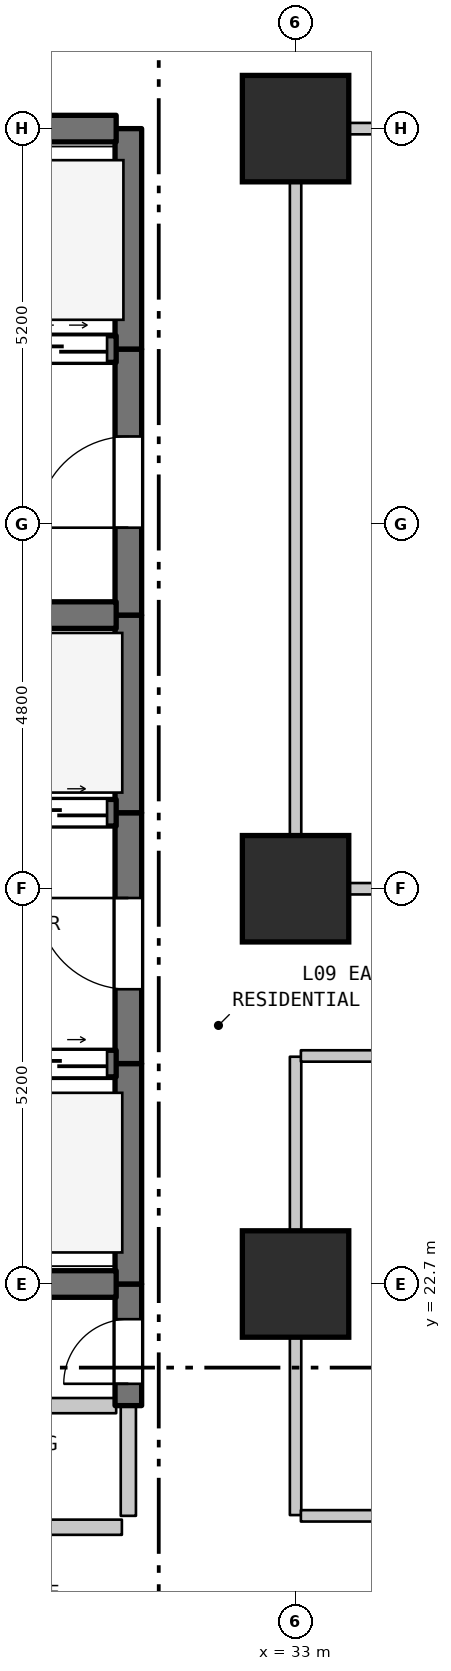
"""IFC4 building model, lengths in metres.
Left out: names, types, materials, properties, quantities, classifications, styles, units other than length and angle.
Written with IfcOpenShell. Run it as: python <this file> out.ifc"""

import sys

from ifc_helpers import new_model, si_unit, direction, frame, frame_2d, origin, origin_2d, place, context, subcontext, project, spatial, rectangle, extrude, element, fill, save


model = new_model("IFC4")
c1 = context("Model", 3, precision=1e-05, world=origin(), true_north=direction((0.0, 1.0)))
c2 = subcontext(c1, "Body", "Model", "MODEL_VIEW")
j1 = project(units=[si_unit("LENGTHUNIT", "METRE"), si_unit("PLANEANGLEUNIT", "RADIAN")], contexts=[c1])
p1 = place(None, origin())
s1 = spatial("IfcSite", under=j1, at=p1, CompositionType="ELEMENT")
p2 = place(p1, origin())
s2 = spatial("IfcBuilding", under=s1, at=p2, CompositionType="ELEMENT")
p3 = place(p2, frame((0.0, 0.0, 42.5)))
s3 = spatial("IfcBuildingStorey", under=s2, at=p3, CompositionType="ELEMENT", Elevation=42.5)
for number, where, z_axis, x_axis in (
    (1, (33.0, 22.7, 0.0), (0.0, 0.0, 1.0), (1.0, 0.0, 0.0)),
    (2, (33.0, 27.9, 0.0), (0.0, 0.0, 1.0), (1.0, 0.0, 0.0)),
    (3, (33.0, 37.9, 0.0), (0.0, 0.0, 1.0), (1.0, 0.0, 0.0)),
):
    element("IfcColumn", number, at=place(p3, frame(where, z_axis=z_axis, x_axis=x_axis)), inside=s3, PredefinedType="COLUMN", context=c2, shape_type="SweptSolid", body=[
        extrude(rectangle(XDim=1.4, YDim=1.4, at=origin_2d()), origin(), (0.0, 0.0, 1.0), 3.7),
    ])
p4 = place(p3, frame((30.8, 19.65, 0.0), z_axis=(0.0, 0.0, 1.0), x_axis=(0.0, 1.0, 0.0)))
e4 = element("IfcWall", 4, at=p4, inside=s3, PredefinedType="STANDARD", context=c2, shape_type="SweptSolid", body=[
    extrude(rectangle(XDim=1.45, YDim=0.2, at=frame_2d((0.725, 0.0))), origin(), (0.0, 0.0, 1.0), 3.385),
])
p5 = place(p3, frame((30.8, 21.1, 0.0), z_axis=(0.0, 0.0, 1.0), x_axis=(0.0, 1.0, 0.0)))
e5 = element("IfcWall", 5, at=p5, inside=s3, PredefinedType="SHEAR", context=c2, shape_type="SweptSolid", body=[
    extrude(rectangle(XDim=1.6, YDim=0.35, at=frame_2d((0.8, 0.0))), origin(), (0.0, 0.0, 1.0), 3.385),
])
p6 = place(p5, frame((0.287, 0.0, 0.0)))
e6 = element("IfcOpeningElement", 6, at=p6, cuts=e5, PredefinedType="OPENING", context=c2, shape_type="SweptSolid", body=[
    extrude(rectangle(XDim=0.85, YDim=2.1, at=frame_2d((0.425, 1.05))), frame((0.0, 0.185, 0.0), z_axis=(0.0, -1.0, 0.0), x_axis=(1.0, 0.0, 0.0)), (0.0, 0.0, 1.0), 0.37),
])
p7 = place(p3, frame((30.8, 22.7, 0.0), z_axis=(0.0, 0.0, 1.0), x_axis=(0.0, 1.0, 0.0)))
e7 = element("IfcWall", 7, at=p7, inside=s3, PredefinedType="SHEAR", context=c2, shape_type="SweptSolid", body=[
    extrude(rectangle(XDim=2.9, YDim=0.35, at=frame_2d((1.45, 0.0))), origin(), (0.0, 0.0, 1.0), 3.385),
])
p8 = place(p3, frame((30.8, 25.6, 0.0), z_axis=(0.0, 0.0, 1.0), x_axis=(0.0, 1.0, 0.0)))
e8 = element("IfcWall", 8, at=p8, inside=s3, PredefinedType="SHEAR", context=c2, shape_type="SweptSolid", body=[
    extrude(rectangle(XDim=3.3, YDim=0.35, at=frame_2d((1.65, 0.0))), origin(), (0.0, 0.0, 1.0), 3.385),
])
p9 = place(p8, frame((0.978, 0.0, 0.0)))
e9 = element("IfcOpeningElement", 9, at=p9, cuts=e8, PredefinedType="OPENING", context=c2, shape_type="SweptSolid", body=[
    extrude(rectangle(XDim=1.2, YDim=2.2, at=frame_2d((0.6, 1.1))), frame((0.0, 0.185, 0.0), z_axis=(0.0, -1.0, 0.0), x_axis=(1.0, 0.0, 0.0)), (0.0, 0.0, 1.0), 0.37),
])
p10 = place(p3, frame((30.8, 28.9, 0.0), z_axis=(0.0, 0.0, 1.0), x_axis=(0.0, 1.0, 0.0)))
e10 = element("IfcWall", 10, at=p10, inside=s3, PredefinedType="SHEAR", context=c2, shape_type="SweptSolid", body=[
    extrude(rectangle(XDim=2.6, YDim=0.35, at=frame_2d((1.3, 0.0))), origin(), (0.0, 0.0, 1.0), 3.385),
])
p11 = place(p3, frame((30.8, 31.5, 0.0), z_axis=(0.0, 0.0, 1.0), x_axis=(0.0, 1.0, 0.0)))
e11 = element("IfcWall", 11, at=p11, inside=s3, PredefinedType="SHEAR", context=c2, shape_type="SweptSolid", body=[
    extrude(rectangle(XDim=3.5, YDim=0.35, at=frame_2d((1.75, 0.0))), origin(), (0.0, 0.0, 1.0), 3.385),
])
p12 = place(p11, frame((1.15, 0.0, 0.0)))
e12 = element("IfcOpeningElement", 12, at=p12, cuts=e11, PredefinedType="OPENING", context=c2, shape_type="SweptSolid", body=[
    extrude(rectangle(XDim=1.2, YDim=2.2, at=frame_2d((0.6, 1.1))), frame((0.0, 0.185, 0.0), z_axis=(0.0, -1.0, 0.0), x_axis=(1.0, 0.0, 0.0)), (0.0, 0.0, 1.0), 0.37),
])
p13 = place(p3, frame((30.8, 35.0, 0.0), z_axis=(0.0, 0.0, 1.0), x_axis=(0.0, 1.0, 0.0)))
e13 = element("IfcWall", 13, at=p13, inside=s3, PredefinedType="SHEAR", context=c2, shape_type="SweptSolid", body=[
    extrude(rectangle(XDim=2.9, YDim=0.35, at=frame_2d((1.45, 0.0))), origin(), (0.0, 0.0, 1.0), 3.385),
])
p14 = place(p3, frame((33.0, 19.66, 0.0), z_axis=(0.0, 0.0, 1.0), x_axis=(0.0, 1.0, 0.0)))
e14 = element("IfcWall", 14, at=p14, inside=s3, PredefinedType="STANDARD", context=c2, shape_type="SweptSolid", body=[
    extrude(rectangle(XDim=6.03, YDim=0.15, at=frame_2d((3.015, 0.0))), origin(), (0.0, 0.0, 1.0), 2.885),
])
p15 = place(p3, frame((33.0, 27.91, 0.0), z_axis=(0.0, 0.0, 1.0), x_axis=(0.0, 1.0, 0.0)))
e15 = element("IfcWall", 15, at=p15, inside=s3, PredefinedType="STANDARD", context=c2, shape_type="SweptSolid", body=[
    extrude(rectangle(XDim=9.98, YDim=0.15, at=frame_2d((4.99, 0.0))), origin(), (0.0, 0.0, 1.0), 2.885),
])
p16 = place(p3, frame((27.285, 19.5, 0.0), z_axis=(0.0, 0.0, 1.0), x_axis=(1.0, 0.0, 0.0)))
e16 = element("IfcWall", 16, at=p16, inside=s3, PredefinedType="STANDARD", context=c2, shape_type="SweptSolid", body=[
    extrude(rectangle(XDim=3.43, YDim=0.2, at=frame_2d((1.715, 0.0))), origin(), (0.0, 0.0, 1.0), 3.385),
])
p17 = place(p16, frame((1.192, 0.0, 0.0)))
e17 = element("IfcOpeningElement", 17, at=p17, cuts=e16, PredefinedType="OPENING", context=c2, shape_type="SweptSolid", body=[
    extrude(rectangle(XDim=0.9, YDim=2.15, at=frame_2d((0.45, 1.075))), frame((0.0, 0.11, 0.0), z_axis=(0.0, -1.0, 0.0), x_axis=(1.0, 0.0, 0.0)), (0.0, 0.0, 1.0), 0.22),
])
p18 = place(p3, frame((33.07, 19.65, 0.0), z_axis=(0.0, 0.0, 1.0), x_axis=(1.0, 0.0, 0.0)))
e18 = element("IfcWall", 18, at=p18, inside=s3, PredefinedType="STANDARD", context=c2, shape_type="SweptSolid", body=[
    extrude(rectangle(XDim=33.27, YDim=0.15, at=frame_2d((16.635, 0.0))), origin(), (0.0, 0.0, 1.0), 3.385),
])
p19 = place(p18, frame((16.065, 0.0, 0.0)))
e19 = element("IfcOpeningElement", 19, at=p19, cuts=e18, PredefinedType="OPENING", context=c2, shape_type="SweptSolid", body=[
    extrude(rectangle(XDim=1.0, YDim=2.15, at=frame_2d((0.5, 1.075))), frame((0.0, 0.085, 0.0), z_axis=(0.0, -1.0, 0.0), x_axis=(1.0, 0.0, 0.0)), (0.0, 0.0, 1.0), 0.17),
])
p20 = place(p3, frame((27.285, 21.1, 0.0), z_axis=(0.0, 0.0, 1.0), x_axis=(1.0, 0.0, 0.0)))
e20 = element("IfcWall", 20, at=p20, inside=s3, PredefinedType="STANDARD", context=c2, shape_type="SweptSolid", body=[
    extrude(rectangle(XDim=3.355, YDim=0.2, at=frame_2d((1.677, 0.0))), origin(), (0.0, 0.0, 1.0), 3.385),
])
p21 = place(p3, frame((27.46, 22.7, 0.0), z_axis=(0.0, 0.0, 1.0), x_axis=(1.0, 0.0, 0.0)))
e21 = element("IfcWall", 21, at=p21, inside=s3, PredefinedType="SHEAR", context=c2, shape_type="SweptSolid", body=[
    extrude(rectangle(XDim=3.18, YDim=0.35, at=frame_2d((1.59, 0.0))), origin(), (0.0, 0.0, 1.0), 3.385),
])
p22 = place(p3, frame((27.46, 25.6, 0.0), z_axis=(0.0, 0.0, 1.0), x_axis=(1.0, 0.0, 0.0)))
e22 = element("IfcWall", 22, at=p22, inside=s3, PredefinedType="SHEAR", context=c2, shape_type="SweptSolid", body=[
    extrude(rectangle(XDim=3.18, YDim=0.35, at=frame_2d((1.59, 0.0))), origin(), (0.0, 0.0, 1.0), 3.385),
])
p23 = place(p22, frame((0.12, 0.0, 0.0)))
e23 = element("IfcOpeningElement", 23, at=p23, cuts=e22, PredefinedType="OPENING", context=c2, shape_type="SweptSolid", body=[
    extrude(rectangle(XDim=1.25, YDim=2.2, at=frame_2d((0.625, 1.1))), frame((0.0, 0.185, 0.0), z_axis=(0.0, -1.0, 0.0), x_axis=(1.0, 0.0, 0.0)), (0.0, 0.0, 1.0), 0.37),
])
p24 = place(p22, frame((1.81, 0.0, 0.0)))
e24 = element("IfcOpeningElement", 24, at=p24, cuts=e22, PredefinedType="OPENING", context=c2, shape_type="SweptSolid", body=[
    extrude(rectangle(XDim=1.25, YDim=2.2, at=frame_2d((0.625, 1.1))), frame((0.0, 0.185, 0.0), z_axis=(0.0, -1.0, 0.0), x_axis=(1.0, 0.0, 0.0)), (0.0, 0.0, 1.0), 0.37),
])
p25 = place(p3, frame((33.07, 25.7, 0.0), z_axis=(0.0, 0.0, 1.0), x_axis=(1.0, 0.0, 0.0)))
e25 = element("IfcWall", 25, at=p25, inside=s3, PredefinedType="STANDARD", context=c2, shape_type="SweptSolid", body=[
    extrude(rectangle(XDim=30.87, YDim=0.15, at=frame_2d((15.435, 0.0))), origin(), (0.0, 0.0, 1.0), 3.385),
])
p26 = place(p3, frame((33.07, 27.9, 0.0), z_axis=(0.0, 0.0, 1.0), x_axis=(1.0, 0.0, 0.0)))
e26 = element("IfcWall", 26, at=p26, inside=s3, PredefinedType="STANDARD", context=c2, shape_type="SweptSolid", body=[
    extrude(rectangle(XDim=30.87, YDim=0.15, at=frame_2d((15.435, 0.0))), origin(), (0.0, 0.0, 1.0), 2.885),
])
p27 = place(p26, frame((14.935, 0.0, 0.0)))
e27 = element("IfcOpeningElement", 27, at=p27, cuts=e26, PredefinedType="OPENING", context=c2, shape_type="SweptSolid", body=[
    extrude(rectangle(XDim=1.0, YDim=2.15, at=frame_2d((0.5, 1.075))), frame((0.0, 0.085, 0.0), z_axis=(0.0, -1.0, 0.0), x_axis=(1.0, 0.0, 0.0)), (0.0, 0.0, 1.0), 0.17),
])
p28 = place(p3, frame((27.46, 28.9, 0.0), z_axis=(0.0, 0.0, 1.0), x_axis=(1.0, 0.0, 0.0)))
e28 = element("IfcWall", 28, at=p28, inside=s3, PredefinedType="SHEAR", context=c2, shape_type="SweptSolid", body=[
    extrude(rectangle(XDim=3.18, YDim=0.35, at=frame_2d((1.59, 0.0))), origin(), (0.0, 0.0, 1.0), 3.385),
])
p29 = place(p28, frame((0.12, 0.0, 0.0)))
e29 = element("IfcOpeningElement", 29, at=p29, cuts=e28, PredefinedType="OPENING", context=c2, shape_type="SweptSolid", body=[
    extrude(rectangle(XDim=1.25, YDim=2.2, at=frame_2d((0.625, 1.1))), frame((0.0, 0.185, 0.0), z_axis=(0.0, -1.0, 0.0), x_axis=(1.0, 0.0, 0.0)), (0.0, 0.0, 1.0), 0.37),
])
p30 = place(p28, frame((1.81, 0.0, 0.0)))
e30 = element("IfcOpeningElement", 30, at=p30, cuts=e28, PredefinedType="OPENING", context=c2, shape_type="SweptSolid", body=[
    extrude(rectangle(XDim=1.25, YDim=2.2, at=frame_2d((0.625, 1.1))), frame((0.0, 0.185, 0.0), z_axis=(0.0, -1.0, 0.0), x_axis=(1.0, 0.0, 0.0)), (0.0, 0.0, 1.0), 0.37),
])
p31 = place(p3, frame((27.46, 31.5, 0.0), z_axis=(0.0, 0.0, 1.0), x_axis=(1.0, 0.0, 0.0)))
e31 = element("IfcWall", 31, at=p31, inside=s3, PredefinedType="SHEAR", context=c2, shape_type="SweptSolid", body=[
    extrude(rectangle(XDim=3.18, YDim=0.35, at=frame_2d((1.59, 0.0))), origin(), (0.0, 0.0, 1.0), 3.385),
])
p32 = place(p3, frame((19.16, 35.0, 0.0), z_axis=(0.0, 0.0, 1.0), x_axis=(1.0, 0.0, 0.0)))
e32 = element("IfcWall", 32, at=p32, inside=s3, PredefinedType="SHEAR", context=c2, shape_type="SweptSolid", body=[
    extrude(rectangle(XDim=11.48, YDim=0.35, at=frame_2d((5.74, 0.0))), origin(), (0.0, 0.0, 1.0), 3.385),
])
p33 = place(p32, frame((0.365, 0.0, 0.0)))
e33 = element("IfcOpeningElement", 33, at=p33, cuts=e32, PredefinedType="OPENING", context=c2, shape_type="SweptSolid", body=[
    extrude(rectangle(XDim=1.35, YDim=2.2, at=frame_2d((0.675, 1.1))), frame((0.0, 0.185, 0.0), z_axis=(0.0, -1.0, 0.0), x_axis=(1.0, 0.0, 0.0)), (0.0, 0.0, 1.0), 0.37),
])
p34 = place(p32, frame((2.765, 0.0, 0.0)))
e34 = element("IfcOpeningElement", 34, at=p34, cuts=e32, PredefinedType="OPENING", context=c2, shape_type="SweptSolid", body=[
    extrude(rectangle(XDim=1.35, YDim=2.2, at=frame_2d((0.675, 1.1))), frame((0.0, 0.185, 0.0), z_axis=(0.0, -1.0, 0.0), x_axis=(1.0, 0.0, 0.0)), (0.0, 0.0, 1.0), 0.37),
])
p35 = place(p32, frame((4.915, 0.0, 0.0)))
e35 = element("IfcOpeningElement", 35, at=p35, cuts=e32, PredefinedType="OPENING", context=c2, shape_type="SweptSolid", body=[
    extrude(rectangle(XDim=1.2, YDim=2.2, at=frame_2d((0.6, 1.1))), frame((0.0, 0.185, 0.0), z_axis=(0.0, -1.0, 0.0), x_axis=(1.0, 0.0, 0.0)), (0.0, 0.0, 1.0), 0.37),
])
p36 = place(p32, frame((6.665, 0.0, 0.0)))
e36 = element("IfcOpeningElement", 36, at=p36, cuts=e32, PredefinedType="OPENING", context=c2, shape_type="SweptSolid", body=[
    extrude(rectangle(XDim=1.2, YDim=2.2, at=frame_2d((0.6, 1.1))), frame((0.0, 0.185, 0.0), z_axis=(0.0, -1.0, 0.0), x_axis=(1.0, 0.0, 0.0)), (0.0, 0.0, 1.0), 0.37),
])
p37 = place(p32, frame((8.415, 0.0, 0.0)))
e37 = element("IfcOpeningElement", 37, at=p37, cuts=e32, PredefinedType="OPENING", context=c2, shape_type="SweptSolid", body=[
    extrude(rectangle(XDim=1.2, YDim=2.2, at=frame_2d((0.6, 1.1))), frame((0.0, 0.185, 0.0), z_axis=(0.0, -1.0, 0.0), x_axis=(1.0, 0.0, 0.0)), (0.0, 0.0, 1.0), 0.37),
])
p38 = place(p32, frame((10.16, 0.0, 0.0)))
e38 = element("IfcOpeningElement", 38, at=p38, cuts=e32, PredefinedType="OPENING", context=c2, shape_type="SweptSolid", body=[
    extrude(rectangle(XDim=1.2, YDim=2.2, at=frame_2d((0.6, 1.1))), frame((0.0, 0.185, 0.0), z_axis=(0.0, -1.0, 0.0), x_axis=(1.0, 0.0, 0.0)), (0.0, 0.0, 1.0), 0.37),
])
p39 = place(p3, frame((19.16, 37.9, 0.0), z_axis=(0.0, 0.0, 1.0), x_axis=(1.0, 0.0, 0.0)))
e39 = element("IfcWall", 39, at=p39, inside=s3, PredefinedType="SHEAR", context=c2, shape_type="SweptSolid", body=[
    extrude(rectangle(XDim=11.48, YDim=0.35, at=frame_2d((5.74, 0.0))), origin(), (0.0, 0.0, 1.0), 3.385),
])
p40 = place(p3, frame((33.07, 37.9, 0.0), z_axis=(0.0, 0.0, 1.0), x_axis=(1.0, 0.0, 0.0)))
e40 = element("IfcWall", 40, at=p40, inside=s3, PredefinedType="STANDARD", context=c2, shape_type="SweptSolid", body=[
    extrude(rectangle(XDim=26.935, YDim=0.15, at=frame_2d((13.467, 0.0))), origin(), (0.0, 0.0, 1.0), 3.385),
])
p41 = place(p6, origin())
e41 = element("IfcDoor", 41, at=p41, inside=s3, OperationType="SINGLE_SWING_LEFT", PredefinedType="DOOR", context=c2, shape_type="SweptSolid", body=[
    extrude(rectangle(XDim=0.85, YDim=2.1, at=frame_2d((0.425, 1.05))), frame((0.0, 0.025, 0.0), z_axis=(0.0, -1.0, 0.0), x_axis=(1.0, 0.0, 0.0)), (0.0, 0.0, 1.0), 0.05),
])
fill(e6, e41)
p42 = place(p9, origin())
e42 = element("IfcDoor", 42, at=p42, inside=s3, OperationType="SINGLE_SWING_RIGHT", PredefinedType="DOOR", context=c2, shape_type="SweptSolid", body=[
    extrude(rectangle(XDim=1.2, YDim=2.2, at=frame_2d((0.6, 1.1))), frame((0.0, 0.025, 0.0), z_axis=(0.0, -1.0, 0.0), x_axis=(1.0, 0.0, 0.0)), (0.0, 0.0, 1.0), 0.05),
])
fill(e9, e42)
p43 = place(p12, origin())
e43 = element("IfcDoor", 43, at=p43, inside=s3, OperationType="SINGLE_SWING_LEFT", PredefinedType="DOOR", context=c2, shape_type="SweptSolid", body=[
    extrude(rectangle(XDim=1.2, YDim=2.2, at=frame_2d((0.6, 1.1))), frame((0.0, 0.025, 0.0), z_axis=(0.0, -1.0, 0.0), x_axis=(1.0, 0.0, 0.0)), (0.0, 0.0, 1.0), 0.05),
])
fill(e12, e43)
p44 = place(p24, origin())
e44 = element("IfcDoor", 44, at=p44, inside=s3, OperationType="DOUBLE_DOOR_SLIDING", PredefinedType="DOOR", context=c2, shape_type="SweptSolid", body=[
    extrude(rectangle(XDim=1.25, YDim=2.2, at=frame_2d((0.625, 1.1))), frame((0.0, 0.025, 0.0), z_axis=(0.0, -1.0, 0.0), x_axis=(1.0, 0.0, 0.0)), (0.0, 0.0, 1.0), 0.05),
])
fill(e24, e44)
p45 = place(p30, origin())
e45 = element("IfcDoor", 45, at=p45, inside=s3, OperationType="DOUBLE_DOOR_SLIDING", PredefinedType="DOOR", context=c2, shape_type="SweptSolid", body=[
    extrude(rectangle(XDim=1.25, YDim=2.2, at=frame_2d((0.625, 1.1))), frame((0.0, 0.025, 0.0), z_axis=(0.0, -1.0, 0.0), x_axis=(1.0, 0.0, 0.0)), (0.0, 0.0, 1.0), 0.05),
])
fill(e30, e45)
p46 = place(p38, origin())
e46 = element("IfcDoor", 46, at=p46, inside=s3, OperationType="DOUBLE_DOOR_SLIDING", PredefinedType="DOOR", context=c2, shape_type="SweptSolid", body=[
    extrude(rectangle(XDim=1.2, YDim=2.2, at=frame_2d((0.6, 1.1))), frame((0.0, 0.025, 0.0), z_axis=(0.0, -1.0, 0.0), x_axis=(1.0, 0.0, 0.0)), (0.0, 0.0, 1.0), 0.05),
])
fill(e38, e46)
save(model, sys.argv[1])
